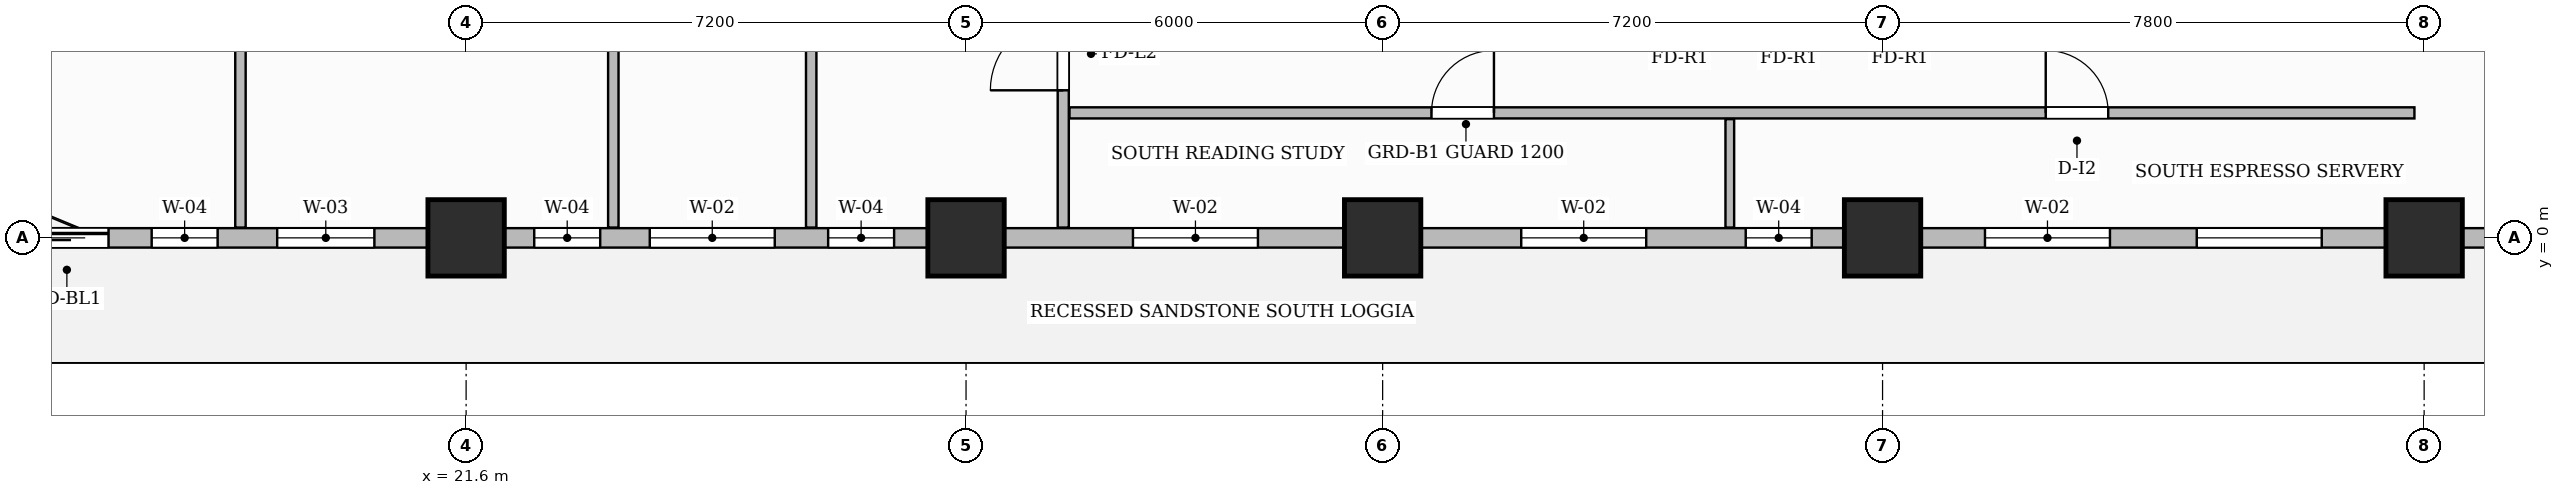
"""IFC4 building model, lengths in metres.
Left out: names, types, materials, properties, quantities, classifications, styles, units other than length and angle.
Written with IfcOpenShell. Run it as: python <this file> out.ifc"""

import sys

from ifc_helpers import new_model, si_unit, direction, frame, frame_2d, origin, origin_2d, place, context, subcontext, project, spatial, rectangle, extrude, source, transform, mapped, element, fill, save


model = new_model("IFC4")
c1 = context("Model", 3, precision=1e-05, world=origin(), true_north=direction((0.0, 1.0)))
c2 = subcontext(c1, "Body", "Model", "MODEL_VIEW")
j1 = project(units=[si_unit("LENGTHUNIT", "METRE"), si_unit("PLANEANGLEUNIT", "RADIAN")], contexts=[c1])
p1 = place(None, origin())
s1 = spatial("IfcSite", under=j1, at=p1, CompositionType="ELEMENT")
p2 = place(p1, origin())
s2 = spatial("IfcBuilding", under=s1, at=p2, CompositionType="ELEMENT")
p3 = place(p2, frame((0.0, 0.0, 65.7)))
s3 = spatial("IfcBuildingStorey", under=s2, at=p3, CompositionType="ELEMENT", Elevation=65.7)
m1 = source(origin(), c2, "Body", "SweptSolid", [
    extrude(rectangle(XDim=1.1, YDim=1.1, at=origin_2d()), origin(), (0.0, 0.0, 1.0), 3.7),
])
for number, where, z_axis, x_axis in (
    (1, (21.6, 0.0, 0.0), (0.0, 0.0, 1.0), (1.0, 0.0, 0.0)),
    (2, (28.8, 0.0, 0.0), (0.0, 0.0, 1.0), (1.0, 0.0, 0.0)),
    (3, (34.8, 0.0, 0.0), (0.0, 0.0, 1.0), (1.0, 0.0, 0.0)),
    (4, (42.0, 0.0, 0.0), (0.0, 0.0, 1.0), (1.0, 0.0, 0.0)),
    (5, (49.8, 0.0, 0.0), (0.0, 0.0, 1.0), (1.0, 0.0, 0.0)),
):
    element("IfcColumn", number, at=place(p3, frame(where, z_axis=z_axis, x_axis=x_axis)), inside=s3, PredefinedType="COLUMN", context=c2, shape_type="MappedRepresentation", body=[
        mapped(m1, transform((0.0, 0.0, 0.0), scale=1.0)),
    ])
p4 = place(p3, frame((30.2, 0.148, 0.0), z_axis=(0.0, 0.0, 1.0), x_axis=(0.0, 1.0, 0.0)))
e6 = element("IfcWall", 6, at=p4, inside=s3, PredefinedType="PARTITIONING", context=c2, shape_type="SweptSolid", body=[
    extrude(rectangle(XDim=9.912, YDim=0.16, at=frame_2d((4.956, 0.0))), origin(), (0.0, 0.0, 1.0), 3.45),
])
p5 = place(p4, frame((1.977, 0.0, 0.0)))
e7 = element("IfcOpeningElement", 7, at=p5, cuts=e6, PredefinedType="OPENING", context=c2, shape_type="SweptSolid", body=[
    extrude(rectangle(XDim=1.05, YDim=2.15, at=frame_2d((0.525, 1.075))), frame((0.0, 0.09, 0.0), z_axis=(0.0, -1.0, 0.0), x_axis=(1.0, 0.0, 0.0)), (0.0, 0.0, 1.0), 0.18),
])
p6 = place(p3, frame((30.29, 1.8, 0.0), z_axis=(0.0, 0.0, 1.0), x_axis=(1.0, 0.0, 0.0)))
e8 = element("IfcWall", 8, at=p6, inside=s3, PredefinedType="PARTITIONING", context=c2, shape_type="SweptSolid", body=[
    extrude(rectangle(XDim=19.37, YDim=0.16, at=frame_2d((9.685, 0.0))), origin(), (0.0, 0.0, 1.0), 3.45),
])
p7 = place(p6, frame((5.213, 0.0, 0.0)))
e9 = element("IfcOpeningElement", 9, at=p7, cuts=e8, PredefinedType="OPENING", context=c2, shape_type="SweptSolid", body=[
    extrude(rectangle(XDim=0.9, YDim=2.15, at=frame_2d((0.45, 1.075))), frame((0.0, 0.09, 0.0), z_axis=(0.0, -1.0, 0.0), x_axis=(1.0, 0.0, 0.0)), (0.0, 0.0, 1.0), 0.18),
])
p8 = place(p6, frame((14.06, 0.0, 0.0)))
e10 = element("IfcOpeningElement", 10, at=p8, cuts=e8, PredefinedType="OPENING", context=c2, shape_type="SweptSolid", body=[
    extrude(rectangle(XDim=0.9, YDim=2.15, at=frame_2d((0.45, 1.075))), frame((0.0, 0.09, 0.0), z_axis=(0.0, -1.0, 0.0), x_axis=(1.0, 0.0, 0.0)), (0.0, 0.0, 1.0), 0.18),
])
p9 = place(p3, frame((39.8, 0.148, 0.0), z_axis=(0.0, 0.0, 1.0), x_axis=(0.0, 1.0, 0.0)))
e11 = element("IfcWall", 11, at=p9, inside=s3, PredefinedType="PARTITIONING", context=c2, shape_type="SweptSolid", body=[
    extrude(rectangle(XDim=1.562, YDim=0.125, at=frame_2d((0.781, 0.0))), origin(), (0.0, 0.0, 1.0), 3.45),
])
for number, where, z_axis, x_axis in (
    (12, (18.35, 0.148, 0.0), (0.0, 0.0, 1.0), (0.0, 1.0, 0.0)),
    (13, (23.72, 0.148, 0.0), (0.0, 0.0, 1.0), (0.0, 1.0, 0.0)),
    (14, (26.57, 0.148, 0.0), (0.0, 0.0, 1.0), (0.0, 1.0, 0.0)),
):
    element("IfcWall", number, at=place(p3, frame(where, z_axis=z_axis, x_axis=x_axis)), inside=s3, PredefinedType="PARTITIONING", context=c2, shape_type="SweptSolid", body=[
        extrude(rectangle(XDim=9.912, YDim=0.15, at=frame_2d((4.956, 0.0))), origin(), (0.0, 0.0, 1.0), 3.45),
    ])
p10 = place(p3, frame((14.4, 0.0, 0.0), z_axis=(0.0, 0.0, 1.0), x_axis=(1.0, 0.0, 0.0)))
e15 = element("IfcWall", 15, at=p10, inside=s3, PredefinedType="SOLIDWALL", context=c2, shape_type="SweptSolid", body=[
    extrude(rectangle(XDim=43.2, YDim=0.28, at=frame_2d((21.6, 0.0))), origin(), (0.0, 0.0, 1.0), 2.885),
])
p11 = place(p10, frame((0.85, 0.0, 0.0)))
e16 = element("IfcOpeningElement", 16, at=p11, cuts=e15, PredefinedType="OPENING", context=c2, shape_type="SweptSolid", body=[
    extrude(rectangle(XDim=1.2, YDim=2.2, at=frame_2d((0.6, 1.1))), frame((0.0, 0.15, 0.0), z_axis=(0.0, -1.0, 0.0), x_axis=(1.0, 0.0, 0.0)), (0.0, 0.0, 1.0), 0.3),
])
p12 = place(p10, frame((2.671, 0.0, 0.8)))
e17 = element("IfcOpeningElement", 17, at=p12, cuts=e15, PredefinedType="OPENING", context=c2, shape_type="SweptSolid", body=[
    extrude(rectangle(XDim=0.95, YDim=1.75, at=frame_2d((0.475, 0.875))), frame((0.0, 0.15, 0.0), z_axis=(0.0, -1.0, 0.0), x_axis=(1.0, 0.0, 0.0)), (0.0, 0.0, 1.0), 0.3),
])
p13 = place(p10, frame((4.479, 0.0, 0.8)))
e18 = element("IfcOpeningElement", 18, at=p13, cuts=e15, PredefinedType="OPENING", context=c2, shape_type="SweptSolid", body=[
    extrude(rectangle(XDim=1.4, YDim=1.85, at=frame_2d((0.7, 0.925))), frame((0.0, 0.15, 0.0), z_axis=(0.0, -1.0, 0.0), x_axis=(1.0, 0.0, 0.0)), (0.0, 0.0, 1.0), 0.3),
])
p14 = place(p10, frame((8.181, 0.0, 0.8)))
e19 = element("IfcOpeningElement", 19, at=p14, cuts=e15, PredefinedType="OPENING", context=c2, shape_type="SweptSolid", body=[
    extrude(rectangle(XDim=0.95, YDim=1.75, at=frame_2d((0.475, 0.875))), frame((0.0, 0.15, 0.0), z_axis=(0.0, -1.0, 0.0), x_axis=(1.0, 0.0, 0.0)), (0.0, 0.0, 1.0), 0.3),
])
p15 = place(p10, frame((9.845, 0.0, 0.8)))
e20 = element("IfcOpeningElement", 20, at=p15, cuts=e15, PredefinedType="OPENING", context=c2, shape_type="SweptSolid", body=[
    extrude(rectangle(XDim=1.8, YDim=1.85, at=frame_2d((0.9, 0.925))), frame((0.0, 0.15, 0.0), z_axis=(0.0, -1.0, 0.0), x_axis=(1.0, 0.0, 0.0)), (0.0, 0.0, 1.0), 0.3),
])
p16 = place(p10, frame((12.414, 0.0, 0.8)))
e21 = element("IfcOpeningElement", 21, at=p16, cuts=e15, PredefinedType="OPENING", context=c2, shape_type="SweptSolid", body=[
    extrude(rectangle(XDim=0.95, YDim=1.75, at=frame_2d((0.475, 0.875))), frame((0.0, 0.15, 0.0), z_axis=(0.0, -1.0, 0.0), x_axis=(1.0, 0.0, 0.0)), (0.0, 0.0, 1.0), 0.3),
])
p17 = place(p10, frame((16.804, 0.0, 0.8)))
e22 = element("IfcOpeningElement", 22, at=p17, cuts=e15, PredefinedType="OPENING", context=c2, shape_type="SweptSolid", body=[
    extrude(rectangle(XDim=1.8, YDim=1.85, at=frame_2d((0.9, 0.925))), frame((0.0, 0.15, 0.0), z_axis=(0.0, -1.0, 0.0), x_axis=(1.0, 0.0, 0.0)), (0.0, 0.0, 1.0), 0.3),
])
p18 = place(p10, frame((22.396, 0.0, 0.8)))
e23 = element("IfcOpeningElement", 23, at=p18, cuts=e15, PredefinedType="OPENING", context=c2, shape_type="SweptSolid", body=[
    extrude(rectangle(XDim=1.8, YDim=1.85, at=frame_2d((0.9, 0.925))), frame((0.0, 0.15, 0.0), z_axis=(0.0, -1.0, 0.0), x_axis=(1.0, 0.0, 0.0)), (0.0, 0.0, 1.0), 0.3),
])
p19 = place(p10, frame((25.629, 0.0, 0.8)))
e24 = element("IfcOpeningElement", 24, at=p19, cuts=e15, PredefinedType="OPENING", context=c2, shape_type="SweptSolid", body=[
    extrude(rectangle(XDim=0.95, YDim=1.75, at=frame_2d((0.475, 0.875))), frame((0.0, 0.15, 0.0), z_axis=(0.0, -1.0, 0.0), x_axis=(1.0, 0.0, 0.0)), (0.0, 0.0, 1.0), 0.3),
])
p20 = place(p10, frame((29.075, 0.0, 0.8)))
e25 = element("IfcOpeningElement", 25, at=p20, cuts=e15, PredefinedType="OPENING", context=c2, shape_type="SweptSolid", body=[
    extrude(rectangle(XDim=1.8, YDim=1.85, at=frame_2d((0.9, 0.925))), frame((0.0, 0.15, 0.0), z_axis=(0.0, -1.0, 0.0), x_axis=(1.0, 0.0, 0.0)), (0.0, 0.0, 1.0), 0.3),
])
p21 = place(p10, frame((32.125, 0.0, 0.8)))
e26 = element("IfcOpeningElement", 26, at=p21, cuts=e15, PredefinedType="OPENING", context=c2, shape_type="SweptSolid", body=[
    extrude(rectangle(XDim=1.8, YDim=1.85, at=frame_2d((0.9, 0.925))), frame((0.0, 0.15, 0.0), z_axis=(0.0, -1.0, 0.0), x_axis=(1.0, 0.0, 0.0)), (0.0, 0.0, 1.0), 0.3),
])
p22 = place(p10, frame((36.946, 0.0, 0.8)))
e27 = element("IfcOpeningElement", 27, at=p22, cuts=e15, PredefinedType="OPENING", context=c2, shape_type="SweptSolid", body=[
    extrude(rectangle(XDim=1.8, YDim=1.85, at=frame_2d((0.9, 0.925))), frame((0.0, 0.15, 0.0), z_axis=(0.0, -1.0, 0.0), x_axis=(1.0, 0.0, 0.0)), (0.0, 0.0, 1.0), 0.3),
])
p23 = place(p10, frame((40.054, 0.0, 0.8)))
e28 = element("IfcOpeningElement", 28, at=p23, cuts=e15, PredefinedType="OPENING", context=c2, shape_type="SweptSolid", body=[
    extrude(rectangle(XDim=1.8, YDim=1.85, at=frame_2d((0.9, 0.925))), frame((0.0, 0.15, 0.0), z_axis=(0.0, -1.0, 0.0), x_axis=(1.0, 0.0, 0.0)), (0.0, 0.0, 1.0), 0.3),
])
m2 = source(origin(), c2, "Body", "SweptSolid", [
    extrude(rectangle(XDim=1.05, YDim=2.15, at=frame_2d((0.525, 1.075))), frame((0.0, 0.025, 0.0), z_axis=(0.0, -1.0, 0.0), x_axis=(1.0, 0.0, 0.0)), (0.0, 0.0, 1.0), 0.05),
])
p24 = place(p5, origin())
e29 = element("IfcDoor", 29, at=p24, inside=s3, OperationType="SINGLE_SWING_LEFT", PredefinedType="DOOR", context=c2, shape_type="MappedRepresentation", body=[
    mapped(m2, transform((0.0, 0.0, 0.0), scale=1.0)),
])
fill(e7, e29)
m3 = source(origin(), c2, "Body", "SweptSolid", [
    extrude(rectangle(XDim=0.9, YDim=2.15, at=frame_2d((0.45, 1.075))), frame((0.0, 0.025, 0.0), z_axis=(0.0, -1.0, 0.0), x_axis=(1.0, 0.0, 0.0)), (0.0, 0.0, 1.0), 0.05),
])
p25 = place(p7, origin())
e30 = element("IfcDoor", 30, at=p25, inside=s3, OperationType="SINGLE_SWING_RIGHT", PredefinedType="DOOR", context=c2, shape_type="MappedRepresentation", body=[
    mapped(m3, transform((0.0, 0.0, 0.0), scale=1.0)),
])
fill(e9, e30)
p26 = place(p8, origin())
e31 = element("IfcDoor", 31, at=p26, inside=s3, OperationType="SINGLE_SWING_LEFT", PredefinedType="DOOR", context=c2, shape_type="MappedRepresentation", body=[
    mapped(m3, transform((0.0, 0.0, 0.0), scale=1.0)),
])
fill(e10, e31)
m4 = source(origin(), c2, "Body", "SweptSolid", [
    extrude(rectangle(XDim=1.2, YDim=2.2, at=frame_2d((0.6, 1.1))), frame((0.0, 0.025, 0.0), z_axis=(0.0, -1.0, 0.0), x_axis=(1.0, 0.0, 0.0)), (0.0, 0.0, 1.0), 0.05),
])
p27 = place(p11, origin())
e32 = element("IfcDoor", 32, at=p27, inside=s3, OperationType="SLIDING_TO_LEFT", PredefinedType="DOOR", context=c2, shape_type="MappedRepresentation", body=[
    mapped(m4, transform((0.0, 0.0, 0.0), scale=1.0)),
])
fill(e16, e32)
m5 = source(origin(), c2, "Body", "SweptSolid", [
    extrude(rectangle(XDim=0.95, YDim=1.75, at=frame_2d((0.475, 0.875))), frame((0.0, 0.03, 0.0), z_axis=(0.0, -1.0, 0.0), x_axis=(1.0, 0.0, 0.0)), (0.0, 0.0, 1.0), 0.06),
])
p28 = place(p12, origin())
e33 = element("IfcWindow", 33, at=p28, inside=s3, PartitioningType="SINGLE_PANEL", PredefinedType="WINDOW", context=c2, shape_type="MappedRepresentation", body=[
    mapped(m5, transform((0.0, 0.0, 0.0), scale=1.0)),
])
fill(e17, e33)
m6 = source(origin(), c2, "Body", "SweptSolid", [
    extrude(rectangle(XDim=1.4, YDim=1.85, at=frame_2d((0.7, 0.925))), frame((0.0, 0.03, 0.0), z_axis=(0.0, -1.0, 0.0), x_axis=(1.0, 0.0, 0.0)), (0.0, 0.0, 1.0), 0.06),
])
p29 = place(p13, origin())
e34 = element("IfcWindow", 34, at=p29, inside=s3, PartitioningType="SINGLE_PANEL", PredefinedType="WINDOW", context=c2, shape_type="MappedRepresentation", body=[
    mapped(m6, transform((0.0, 0.0, 0.0), scale=1.0)),
])
fill(e18, e34)
p30 = place(p14, origin())
e35 = element("IfcWindow", 35, at=p30, inside=s3, PartitioningType="SINGLE_PANEL", PredefinedType="WINDOW", context=c2, shape_type="MappedRepresentation", body=[
    mapped(m5, transform((0.0, 0.0, 0.0), scale=1.0)),
])
fill(e19, e35)
m7 = source(origin(), c2, "Body", "SweptSolid", [
    extrude(rectangle(XDim=1.8, YDim=1.85, at=frame_2d((0.9, 0.925))), frame((0.0, 0.03, 0.0), z_axis=(0.0, -1.0, 0.0), x_axis=(1.0, 0.0, 0.0)), (0.0, 0.0, 1.0), 0.06),
])
p31 = place(p15, origin())
e36 = element("IfcWindow", 36, at=p31, inside=s3, PartitioningType="DOUBLE_PANEL_VERTICAL", PredefinedType="WINDOW", context=c2, shape_type="MappedRepresentation", body=[
    mapped(m7, transform((0.0, 0.0, 0.0), scale=1.0)),
])
fill(e20, e36)
p32 = place(p16, origin())
e37 = element("IfcWindow", 37, at=p32, inside=s3, PartitioningType="SINGLE_PANEL", PredefinedType="WINDOW", context=c2, shape_type="MappedRepresentation", body=[
    mapped(m5, transform((0.0, 0.0, 0.0), scale=1.0)),
])
fill(e21, e37)
p33 = place(p17, origin())
e38 = element("IfcWindow", 38, at=p33, inside=s3, PartitioningType="DOUBLE_PANEL_VERTICAL", PredefinedType="WINDOW", context=c2, shape_type="MappedRepresentation", body=[
    mapped(m7, transform((0.0, 0.0, 0.0), scale=1.0)),
])
fill(e22, e38)
p34 = place(p18, origin())
e39 = element("IfcWindow", 39, at=p34, inside=s3, PartitioningType="DOUBLE_PANEL_VERTICAL", PredefinedType="WINDOW", context=c2, shape_type="MappedRepresentation", body=[
    mapped(m7, transform((0.0, 0.0, 0.0), scale=1.0)),
])
fill(e23, e39)
p35 = place(p19, origin())
e40 = element("IfcWindow", 40, at=p35, inside=s3, PartitioningType="SINGLE_PANEL", PredefinedType="WINDOW", context=c2, shape_type="MappedRepresentation", body=[
    mapped(m5, transform((0.0, 0.0, 0.0), scale=1.0)),
])
fill(e24, e40)
p36 = place(p20, origin())
e41 = element("IfcWindow", 41, at=p36, inside=s3, PartitioningType="DOUBLE_PANEL_VERTICAL", PredefinedType="WINDOW", context=c2, shape_type="MappedRepresentation", body=[
    mapped(m7, transform((0.0, 0.0, 0.0), scale=1.0)),
])
fill(e25, e41)
p37 = place(p21, origin())
e42 = element("IfcWindow", 42, at=p37, inside=s3, PartitioningType="DOUBLE_PANEL_VERTICAL", PredefinedType="WINDOW", context=c2, shape_type="MappedRepresentation", body=[
    mapped(m7, transform((0.0, 0.0, 0.0), scale=1.0)),
])
fill(e26, e42)
save(model, sys.argv[1])
